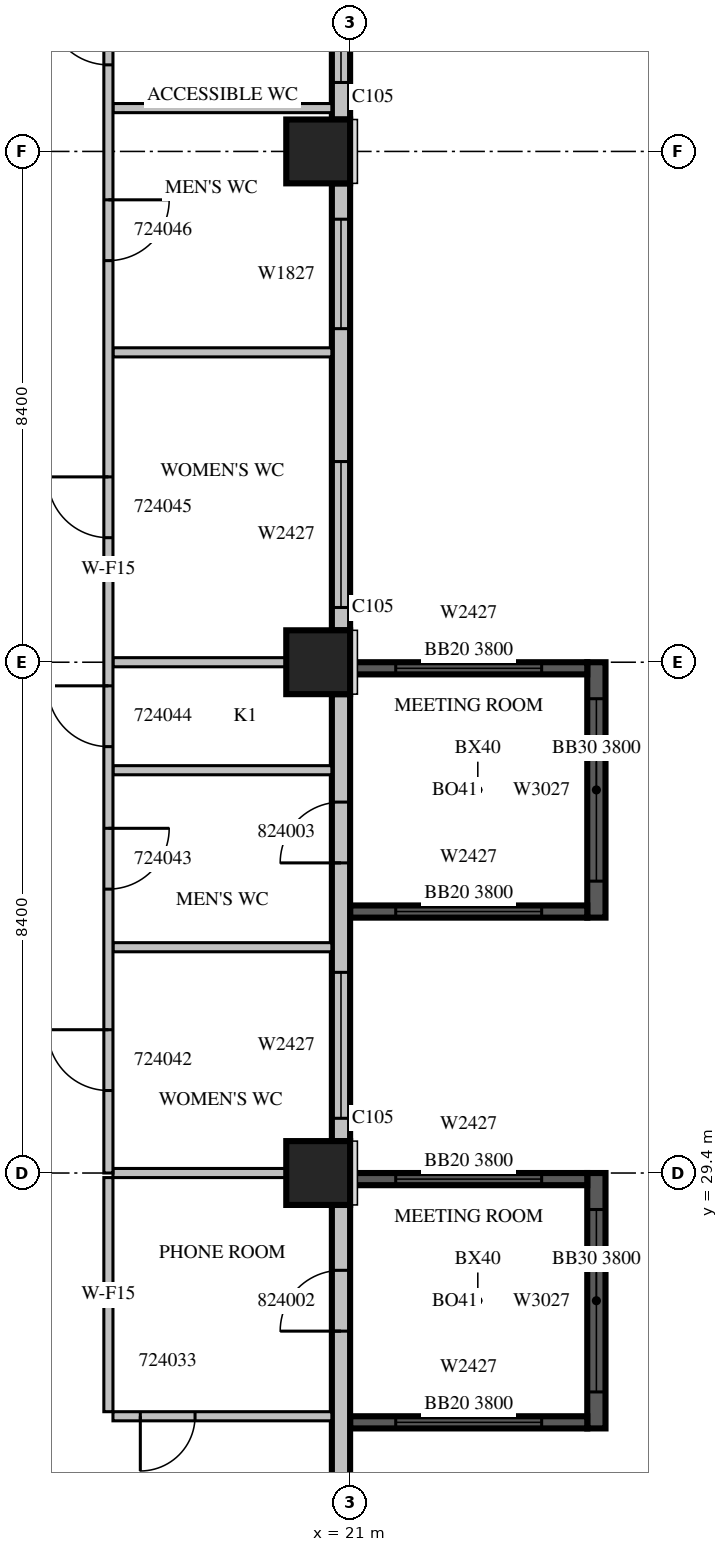
"""IFC4 building model, lengths in metres.
Left out: names, types, materials, properties, quantities, classifications, styles, units other than length and angle.
Written with IfcOpenShell. Run it as: python <this file> out.ifc"""

import sys

from ifc_helpers import new_model, si_unit, direction, frame, frame_2d, origin, origin_2d, place, context, subcontext, project, spatial, rectangle, extrude, source, transform, mapped, element, fill, save


model = new_model("IFC4")
c1 = context("Model", 3, precision=1e-05, world=origin(), true_north=direction((0.0, 1.0)))
c2 = subcontext(c1, "Body", "Model", "MODEL_VIEW")
j1 = project(units=[si_unit("LENGTHUNIT", "METRE"), si_unit("PLANEANGLEUNIT", "RADIAN")], contexts=[c1])
p1 = place(None, origin())
s1 = spatial("IfcSite", under=j1, at=p1, CompositionType="ELEMENT")
p2 = place(p1, origin())
s2 = spatial("IfcBuilding", under=s1, at=p2, CompositionType="ELEMENT")
p3 = place(p2, frame((0.0, 0.0, 111.9)))
s3 = spatial("IfcBuildingStorey", under=s2, at=p3, CompositionType="ELEMENT", Elevation=111.9)
m1 = source(origin(), c2, "Body", "SweptSolid", [
    extrude(rectangle(XDim=1.05, YDim=1.05, at=origin_2d()), origin(), (0.0, 0.0, 1.0), 4.2),
])
for number, where, z_axis, x_axis in (
    (1, (20.475, 29.4, 0.0), (0.0, 0.0, 1.0), (1.0, 0.0, 0.0)),
    (2, (20.475, 37.8, 0.0), (0.0, 0.0, 1.0), (1.0, 0.0, 0.0)),
    (3, (20.475, 46.2, 0.0), (0.0, 0.0, 1.0), (1.0, 0.0, 0.0)),
):
    element("IfcColumn", number, at=place(p3, frame(where, z_axis=z_axis, x_axis=x_axis)), inside=s3, PredefinedType="COLUMN", context=c2, shape_type="MappedRepresentation", body=[
        mapped(m1, transform((0.0, 0.0, 0.0), scale=1.0)),
    ])
m2 = source(origin(), c2, "Body", "SweptSolid", [
    extrude(rectangle(XDim=4.2, YDim=0.3, at=frame_2d((2.1, 0.0))), origin(), (0.0, 0.0, 1.0), 3.8),
])
p4 = place(p3, frame((25.05, 25.2, 0.0), z_axis=(0.0, 0.0, 1.0), x_axis=(0.0, 1.0, 0.0)))
e4 = element("IfcWall", 4, at=p4, inside=s3, PredefinedType="SOLIDWALL", context=c2, shape_type="MappedRepresentation", body=[
    mapped(m2, transform((0.0, 0.0, 0.0), scale=1.0)),
])
m3 = source(origin(), c2, "Body", "SweptSolid", [
    extrude(rectangle(XDim=3.0, YDim=2.7, at=frame_2d((1.5, 1.35))), frame((0.0, 0.16, 0.0), z_axis=(0.0, -1.0, 0.0), x_axis=(1.0, 0.0, 0.0)), (0.0, 0.0, 1.0), 0.32),
])
p5 = place(p4, frame((0.6, 0.0, 0.6)))
e5 = element("IfcOpeningElement", 5, at=p5, cuts=e4, PredefinedType="OPENING", context=c2, shape_type="MappedRepresentation", body=[
    mapped(m3, transform((0.0, 0.0, 0.0), scale=1.0)),
])
m4 = source(origin(), c2, "Body", "SweptSolid", [
    extrude(rectangle(XDim=3.9, YDim=0.2, at=frame_2d((1.95, 0.0))), origin(), (0.0, 0.0, 1.0), 3.8),
])
p6 = place(p3, frame((21.0, 25.3, 0.0), z_axis=(0.0, 0.0, 1.0), x_axis=(1.0, 0.0, 0.0)))
e6 = element("IfcWall", 6, at=p6, inside=s3, PredefinedType="SOLIDWALL", context=c2, shape_type="MappedRepresentation", body=[
    mapped(m4, transform((0.0, 0.0, 0.0), scale=1.0)),
])
m5 = source(origin(), c2, "Body", "SweptSolid", [
    extrude(rectangle(XDim=2.4, YDim=2.7, at=frame_2d((1.2, 1.35))), frame((0.0, 0.11, 0.0), z_axis=(0.0, -1.0, 0.0), x_axis=(1.0, 0.0, 0.0)), (0.0, 0.0, 1.0), 0.22),
])
p7 = place(p6, frame((0.75, 0.0, 0.6)))
e7 = element("IfcOpeningElement", 7, at=p7, cuts=e6, PredefinedType="OPENING", context=c2, shape_type="MappedRepresentation", body=[
    mapped(m5, transform((0.0, 0.0, 0.0), scale=1.0)),
])
p8 = place(p3, frame((21.0, 29.3, 0.0), z_axis=(0.0, 0.0, 1.0), x_axis=(1.0, 0.0, 0.0)))
e8 = element("IfcWall", 8, at=p8, inside=s3, PredefinedType="SOLIDWALL", context=c2, shape_type="MappedRepresentation", body=[
    mapped(m4, transform((0.0, 0.0, 0.0), scale=1.0)),
])
p9 = place(p8, frame((0.75, 0.0, 0.6)))
e9 = element("IfcOpeningElement", 9, at=p9, cuts=e8, PredefinedType="OPENING", context=c2, shape_type="MappedRepresentation", body=[
    mapped(m5, transform((0.0, 0.0, 0.0), scale=1.0)),
])
p10 = place(p3, frame((25.05, 33.6, 0.0), z_axis=(0.0, 0.0, 1.0), x_axis=(0.0, 1.0, 0.0)))
e10 = element("IfcWall", 10, at=p10, inside=s3, PredefinedType="SOLIDWALL", context=c2, shape_type="MappedRepresentation", body=[
    mapped(m2, transform((0.0, 0.0, 0.0), scale=1.0)),
])
p11 = place(p10, frame((0.6, 0.0, 0.6)))
e11 = element("IfcOpeningElement", 11, at=p11, cuts=e10, PredefinedType="OPENING", context=c2, shape_type="MappedRepresentation", body=[
    mapped(m3, transform((0.0, 0.0, 0.0), scale=1.0)),
])
p12 = place(p3, frame((21.0, 33.7, 0.0), z_axis=(0.0, 0.0, 1.0), x_axis=(1.0, 0.0, 0.0)))
e12 = element("IfcWall", 12, at=p12, inside=s3, PredefinedType="SOLIDWALL", context=c2, shape_type="MappedRepresentation", body=[
    mapped(m4, transform((0.0, 0.0, 0.0), scale=1.0)),
])
p13 = place(p12, frame((0.75, 0.0, 0.6)))
e13 = element("IfcOpeningElement", 13, at=p13, cuts=e12, PredefinedType="OPENING", context=c2, shape_type="MappedRepresentation", body=[
    mapped(m5, transform((0.0, 0.0, 0.0), scale=1.0)),
])
p14 = place(p3, frame((21.0, 37.7, 0.0), z_axis=(0.0, 0.0, 1.0), x_axis=(1.0, 0.0, 0.0)))
e14 = element("IfcWall", 14, at=p14, inside=s3, PredefinedType="SOLIDWALL", context=c2, shape_type="MappedRepresentation", body=[
    mapped(m4, transform((0.0, 0.0, 0.0), scale=1.0)),
])
p15 = place(p14, frame((0.75, 0.0, 0.6)))
e15 = element("IfcOpeningElement", 15, at=p15, cuts=e14, PredefinedType="OPENING", context=c2, shape_type="MappedRepresentation", body=[
    mapped(m5, transform((0.0, 0.0, 0.0), scale=1.0)),
])
m6 = source(origin(), c2, "Body", "SweptSolid", [
    extrude(rectangle(XDim=6.875, YDim=0.3, at=frame_2d((3.438, 0.0))), origin(), (0.0, 0.0, 1.0), 3.8),
])
p16 = place(p3, frame((20.85, 22.0, 0.0), z_axis=(0.0, 0.0, 1.0), x_axis=(0.0, 1.0, 0.0)))
e16 = element("IfcWall", 16, at=p16, inside=s3, PredefinedType="STANDARD", context=c2, shape_type="MappedRepresentation", body=[
    mapped(m6, transform((0.0, 0.0, 0.0), scale=1.0)),
])
m7 = source(origin(), c2, "Body", "SweptSolid", [
    extrude(rectangle(XDim=1.8, YDim=2.7, at=frame_2d((0.9, 1.35))), frame((0.0, 0.16, 0.0), z_axis=(0.0, -1.0, 0.0), x_axis=(1.0, 0.0, 0.0)), (0.0, 0.0, 1.0), 0.32),
])
p17 = place(p16, frame((0.2, 0.0, 0.6)))
e17 = element("IfcOpeningElement", 17, at=p17, cuts=e16, PredefinedType="OPENING", context=c2, shape_type="MappedRepresentation", body=[
    mapped(m7, transform((0.0, 0.0, 0.0), scale=1.0)),
])
m8 = source(origin(), c2, "Body", "SweptSolid", [
    extrude(rectangle(XDim=1.0, YDim=2.1, at=frame_2d((0.5, 1.05))), frame((0.0, 0.16, 0.0), z_axis=(0.0, -1.0, 0.0), x_axis=(1.0, 0.0, 0.0)), (0.0, 0.0, 1.0), 0.32),
])
p18 = place(p16, frame((4.8, 0.0, 0.0)))
e18 = element("IfcOpeningElement", 18, at=p18, cuts=e16, PredefinedType="OPENING", context=c2, shape_type="MappedRepresentation", body=[
    mapped(m8, transform((0.0, 0.0, 0.0), scale=1.0)),
])
m9 = source(origin(), c2, "Body", "SweptSolid", [
    extrude(rectangle(XDim=7.35, YDim=0.3, at=frame_2d((3.675, 0.0))), origin(), (0.0, 0.0, 1.0), 3.8),
])
p19 = place(p3, frame((20.85, 29.925, 0.0), z_axis=(0.0, 0.0, 1.0), x_axis=(0.0, 1.0, 0.0)))
e19 = element("IfcWall", 19, at=p19, inside=s3, PredefinedType="STANDARD", context=c2, shape_type="MappedRepresentation", body=[
    mapped(m9, transform((0.0, 0.0, 0.0), scale=1.0)),
])
m10 = source(origin(), c2, "Body", "SweptSolid", [
    extrude(rectangle(XDim=2.4, YDim=2.7, at=frame_2d((1.2, 1.35))), frame((0.0, 0.16, 0.0), z_axis=(0.0, -1.0, 0.0), x_axis=(1.0, 0.0, 0.0)), (0.0, 0.0, 1.0), 0.32),
])
p20 = place(p19, frame((0.375, 0.0, 0.6)))
e20 = element("IfcOpeningElement", 20, at=p20, cuts=e19, PredefinedType="OPENING", context=c2, shape_type="MappedRepresentation", body=[
    mapped(m10, transform((0.0, 0.0, 0.0), scale=1.0)),
])
p21 = place(p19, frame((4.575, 0.0, 0.0)))
e21 = element("IfcOpeningElement", 21, at=p21, cuts=e19, PredefinedType="OPENING", context=c2, shape_type="MappedRepresentation", body=[
    mapped(m8, transform((0.0, 0.0, 0.0), scale=1.0)),
])
p22 = place(p3, frame((20.85, 38.325, 0.0), z_axis=(0.0, 0.0, 1.0), x_axis=(0.0, 1.0, 0.0)))
e22 = element("IfcWall", 22, at=p22, inside=s3, PredefinedType="STANDARD", context=c2, shape_type="MappedRepresentation", body=[
    mapped(m9, transform((0.0, 0.0, 0.0), scale=1.0)),
])
p23 = place(p22, frame((0.375, 0.0, 0.6)))
e23 = element("IfcOpeningElement", 23, at=p23, cuts=e22, PredefinedType="OPENING", context=c2, shape_type="MappedRepresentation", body=[
    mapped(m10, transform((0.0, 0.0, 0.0), scale=1.0)),
])
p24 = place(p22, frame((4.96, 0.0, 0.6)))
e24 = element("IfcOpeningElement", 24, at=p24, cuts=e22, PredefinedType="OPENING", context=c2, shape_type="MappedRepresentation", body=[
    mapped(m7, transform((0.0, 0.0, 0.0), scale=1.0)),
])
m11 = source(origin(), c2, "Body", "SweptSolid", [
    extrude(rectangle(XDim=2.835, YDim=0.3, at=frame_2d((1.417, 0.0))), origin(), (0.0, 0.0, 1.0), 3.8),
])
p25 = place(p3, frame((20.85, 46.725, 0.0), z_axis=(0.0, 0.0, 1.0), x_axis=(0.0, 1.0, 0.0)))
e25 = element("IfcWall", 25, at=p25, inside=s3, PredefinedType="STANDARD", context=c2, shape_type="MappedRepresentation", body=[
    mapped(m11, transform((0.0, 0.0, 0.0), scale=1.0)),
])
m12 = source(origin(), c2, "Body", "SweptSolid", [
    extrude(rectangle(XDim=1.2, YDim=2.7, at=frame_2d((0.6, 1.35))), frame((0.0, 0.16, 0.0), z_axis=(0.0, -1.0, 0.0), x_axis=(1.0, 0.0, 0.0)), (0.0, 0.0, 1.0), 0.32),
])
p26 = place(p25, frame((0.609, 0.0, 0.6)))
e26 = element("IfcOpeningElement", 26, at=p26, cuts=e25, PredefinedType="OPENING", context=c2, shape_type="MappedRepresentation", body=[
    mapped(m12, transform((0.0, 0.0, 0.0), scale=1.0)),
])
m13 = source(origin(), c2, "Body", "SweptSolid", [
    extrude(rectangle(XDim=3.6, YDim=0.15, at=frame_2d((1.8, 0.0))), origin(), (0.0, 0.0, 1.0), 3.8),
])
p27 = place(p3, frame((17.1, 25.4, 0.0), z_axis=(0.0, 0.0, 1.0), x_axis=(1.0, 0.0, 0.0)))
e27 = element("IfcWall", 27, at=p27, inside=s3, PredefinedType="PARTITIONING", context=c2, shape_type="MappedRepresentation", body=[
    mapped(m13, transform((0.0, 0.0, 0.0), scale=1.0)),
])
m14 = source(origin(), c2, "Body", "SweptSolid", [
    extrude(rectangle(XDim=0.9, YDim=2.1, at=frame_2d((0.45, 1.05))), frame((0.0, 0.085, 0.0), z_axis=(0.0, -1.0, 0.0), x_axis=(1.0, 0.0, 0.0)), (0.0, 0.0, 1.0), 0.17),
])
p28 = place(p27, frame((0.45, 0.0, 0.0)))
e28 = element("IfcOpeningElement", 28, at=p28, cuts=e27, PredefinedType="OPENING", context=c2, shape_type="MappedRepresentation", body=[
    mapped(m14, transform((0.0, 0.0, 0.0), scale=1.0)),
])
m15 = source(origin(), c2, "Body", "SweptSolid", [
    extrude(rectangle(XDim=3.85, YDim=0.15, at=frame_2d((1.925, 0.0))), origin(), (0.0, 0.0, 1.0), 3.8),
])
p29 = place(p3, frame((17.025, 29.325, 0.0), z_axis=(0.0, 0.0, 1.0), x_axis=(0.0, -1.0, 0.0)))
e29 = element("IfcWall", 29, at=p29, inside=s3, PredefinedType="PARTITIONING", context=c2, shape_type="MappedRepresentation", body=[
    mapped(m15, transform((0.0, 0.0, 0.0), scale=1.0)),
])
m16 = source(origin(), c2, "Body", "SweptSolid", [
    extrude(rectangle(XDim=2.851, YDim=0.15, at=frame_2d((1.425, 0.0))), origin(), (0.0, 0.0, 1.0), 3.8),
])
p30 = place(p3, frame((19.951, 29.4, 0.0), z_axis=(0.0, 0.0, 1.0), x_axis=(-1.0, 0.0, 0.0)))
e30 = element("IfcWall", 30, at=p30, inside=s3, PredefinedType="PARTITIONING", context=c2, shape_type="MappedRepresentation", body=[
    mapped(m16, transform((0.0, 0.0, 0.0), scale=1.0)),
])
for number, where, z_axis, x_axis in (
    (31, (17.1, 33.113, 0.0), (0.0, 0.0, 1.0), (1.0, 0.0, 0.0)),
    (32, (17.1, 36.024, 0.0), (0.0, 0.0, 1.0), (1.0, 0.0, 0.0)),
    (33, (17.1, 42.896, 0.0), (0.0, 0.0, 1.0), (1.0, 0.0, 0.0)),
    (34, (17.1, 46.913, 0.0), (0.0, 0.0, 1.0), (1.0, 0.0, 0.0)),
):
    element("IfcWall", number, at=place(p3, frame(where, z_axis=z_axis, x_axis=x_axis)), inside=s3, PredefinedType="PARTITIONING", context=c2, shape_type="MappedRepresentation", body=[
        mapped(m13, transform((0.0, 0.0, 0.0), scale=1.0)),
    ])
p31 = place(p3, frame((19.951, 37.8, 0.0), z_axis=(0.0, 0.0, 1.0), x_axis=(-1.0, 0.0, 0.0)))
e35 = element("IfcWall", 35, at=p31, inside=s3, PredefinedType="PARTITIONING", context=c2, shape_type="MappedRepresentation", body=[
    mapped(m16, transform((0.0, 0.0, 0.0), scale=1.0)),
])
m17 = source(origin(), c2, "Body", "SweptSolid", [
    extrude(rectangle(XDim=19.86, YDim=0.15, at=frame_2d((9.93, 0.0))), origin(), (0.0, 0.0, 1.0), 3.8),
])
p32 = place(p3, frame((17.025, 49.26, 0.0), z_axis=(0.0, 0.0, 1.0), x_axis=(0.0, -1.0, 0.0)))
e36 = element("IfcWall", 36, at=p32, inside=s3, PredefinedType="PARTITIONING", context=c2, shape_type="MappedRepresentation", body=[
    mapped(m17, transform((0.0, 0.0, 0.0), scale=1.0)),
])
m18 = source(origin(), c2, "Body", "SweptSolid", [
    extrude(rectangle(XDim=1.0, YDim=2.1, at=frame_2d((0.5, 1.05))), frame((0.0, 0.085, 0.0), z_axis=(0.0, -1.0, 0.0), x_axis=(1.0, 0.0, 0.0)), (0.0, 0.0, 1.0), 0.17),
])
p33 = place(p32, frame((17.503, 0.0, 0.0)))
e37 = element("IfcOpeningElement", 37, at=p33, cuts=e36, PredefinedType="OPENING", context=c2, shape_type="MappedRepresentation", body=[
    mapped(m18, transform((0.0, 0.0, 0.0), scale=1.0)),
])
p34 = place(p32, frame((14.191, 0.0, 0.0)))
e38 = element("IfcOpeningElement", 38, at=p34, cuts=e36, PredefinedType="OPENING", context=c2, shape_type="MappedRepresentation", body=[
    mapped(m18, transform((0.0, 0.0, 0.0), scale=1.0)),
])
p35 = place(p32, frame((11.848, 0.0, 0.0)))
e39 = element("IfcOpeningElement", 39, at=p35, cuts=e36, PredefinedType="OPENING", context=c2, shape_type="MappedRepresentation", body=[
    mapped(m18, transform((0.0, 0.0, 0.0), scale=1.0)),
])
p36 = place(p32, frame((8.412, 0.0, 0.0)))
e40 = element("IfcOpeningElement", 40, at=p36, cuts=e36, PredefinedType="OPENING", context=c2, shape_type="MappedRepresentation", body=[
    mapped(m18, transform((0.0, 0.0, 0.0), scale=1.0)),
])
p37 = place(p32, frame((3.856, 0.0, 0.0)))
e41 = element("IfcOpeningElement", 41, at=p37, cuts=e36, PredefinedType="OPENING", context=c2, shape_type="MappedRepresentation", body=[
    mapped(m18, transform((0.0, 0.0, 0.0), scale=1.0)),
])
p38 = place(p32, frame((0.636, 0.0, 0.0)))
e42 = element("IfcOpeningElement", 42, at=p38, cuts=e36, PredefinedType="OPENING", context=c2, shape_type="MappedRepresentation", body=[
    mapped(m18, transform((0.0, 0.0, 0.0), scale=1.0)),
])
m19 = source(origin(), c2, "Body", "SweptSolid", [
    extrude(rectangle(XDim=3.0, YDim=2.7, at=frame_2d((1.5, 1.35))), frame((0.0, 0.03, 0.0), z_axis=(0.0, -1.0, 0.0), x_axis=(1.0, 0.0, 0.0)), (0.0, 0.0, 1.0), 0.06),
])
p39 = place(p5, origin())
e43 = element("IfcWindow", 43, at=p39, inside=s3, PartitioningType="SINGLE_PANEL", PredefinedType="WINDOW", context=c2, shape_type="MappedRepresentation", body=[
    mapped(m19, transform((0.0, 0.0, 0.0), scale=1.0)),
])
fill(e5, e43)
m20 = source(origin(), c2, "Body", "SweptSolid", [
    extrude(rectangle(XDim=2.4, YDim=2.7, at=frame_2d((1.2, 1.35))), frame((0.0, 0.03, 0.0), z_axis=(0.0, -1.0, 0.0), x_axis=(1.0, 0.0, 0.0)), (0.0, 0.0, 1.0), 0.06),
])
p40 = place(p7, origin())
e44 = element("IfcWindow", 44, at=p40, inside=s3, PartitioningType="SINGLE_PANEL", PredefinedType="WINDOW", context=c2, shape_type="MappedRepresentation", body=[
    mapped(m20, transform((0.0, 0.0, 0.0), scale=1.0)),
])
fill(e7, e44)
p41 = place(p9, origin())
e45 = element("IfcWindow", 45, at=p41, inside=s3, PartitioningType="SINGLE_PANEL", PredefinedType="WINDOW", context=c2, shape_type="MappedRepresentation", body=[
    mapped(m20, transform((0.0, 0.0, 0.0), scale=1.0)),
])
fill(e9, e45)
p42 = place(p11, origin())
e46 = element("IfcWindow", 46, at=p42, inside=s3, PartitioningType="SINGLE_PANEL", PredefinedType="WINDOW", context=c2, shape_type="MappedRepresentation", body=[
    mapped(m19, transform((0.0, 0.0, 0.0), scale=1.0)),
])
fill(e11, e46)
p43 = place(p13, origin())
e47 = element("IfcWindow", 47, at=p43, inside=s3, PartitioningType="SINGLE_PANEL", PredefinedType="WINDOW", context=c2, shape_type="MappedRepresentation", body=[
    mapped(m20, transform((0.0, 0.0, 0.0), scale=1.0)),
])
fill(e13, e47)
p44 = place(p15, origin())
e48 = element("IfcWindow", 48, at=p44, inside=s3, PartitioningType="SINGLE_PANEL", PredefinedType="WINDOW", context=c2, shape_type="MappedRepresentation", body=[
    mapped(m20, transform((0.0, 0.0, 0.0), scale=1.0)),
])
fill(e15, e48)
p45 = place(p20, origin())
e49 = element("IfcWindow", 49, at=p45, inside=s3, PartitioningType="SINGLE_PANEL", PredefinedType="WINDOW", context=c2, shape_type="MappedRepresentation", body=[
    mapped(m20, transform((0.0, 0.0, 0.0), scale=1.0)),
])
fill(e20, e49)
p46 = place(p23, origin())
e50 = element("IfcWindow", 50, at=p46, inside=s3, PartitioningType="SINGLE_PANEL", PredefinedType="WINDOW", context=c2, shape_type="MappedRepresentation", body=[
    mapped(m20, transform((0.0, 0.0, 0.0), scale=1.0)),
])
fill(e23, e50)
m21 = source(origin(), c2, "Body", "SweptSolid", [
    extrude(rectangle(XDim=1.8, YDim=2.7, at=frame_2d((0.9, 1.35))), frame((0.0, 0.03, 0.0), z_axis=(0.0, -1.0, 0.0), x_axis=(1.0, 0.0, 0.0)), (0.0, 0.0, 1.0), 0.06),
])
p47 = place(p24, origin())
e51 = element("IfcWindow", 51, at=p47, inside=s3, PartitioningType="SINGLE_PANEL", PredefinedType="WINDOW", context=c2, shape_type="MappedRepresentation", body=[
    mapped(m21, transform((0.0, 0.0, 0.0), scale=1.0)),
])
fill(e24, e51)
m22 = source(origin(), c2, "Body", "SweptSolid", [
    extrude(rectangle(XDim=1.2, YDim=2.7, at=frame_2d((0.6, 1.35))), frame((0.0, 0.03, 0.0), z_axis=(0.0, -1.0, 0.0), x_axis=(1.0, 0.0, 0.0)), (0.0, 0.0, 1.0), 0.06),
])
p48 = place(p26, origin())
e52 = element("IfcWindow", 52, at=p48, inside=s3, PartitioningType="SINGLE_PANEL", PredefinedType="WINDOW", context=c2, shape_type="MappedRepresentation", body=[
    mapped(m22, transform((0.0, 0.0, 0.0), scale=1.0)),
])
fill(e26, e52)
m23 = source(origin(), c2, "Body", "SweptSolid", [
    extrude(rectangle(XDim=0.9, YDim=2.1, at=frame_2d((0.45, 1.05))), frame((0.0, 0.025, 0.0), z_axis=(0.0, -1.0, 0.0), x_axis=(1.0, 0.0, 0.0)), (0.0, 0.0, 1.0), 0.05),
])
p49 = place(p28, origin())
e53 = element("IfcDoor", 53, at=p49, inside=s3, OperationType="SINGLE_SWING_RIGHT", PredefinedType="DOOR", context=c2, shape_type="MappedRepresentation", body=[
    mapped(m23, transform((0.0, 0.0, 0.0), scale=1.0)),
])
fill(e28, e53)
m24 = source(origin(), c2, "Body", "SweptSolid", [
    extrude(rectangle(XDim=1.0, YDim=2.1, at=frame_2d((0.5, 1.05))), frame((0.0, 0.025, 0.0), z_axis=(0.0, -1.0, 0.0), x_axis=(1.0, 0.0, 0.0)), (0.0, 0.0, 1.0), 0.05),
])
p50 = place(p33, origin())
e54 = element("IfcDoor", 54, at=p50, inside=s3, OperationType="SINGLE_SWING_RIGHT", PredefinedType="DOOR", context=c2, shape_type="MappedRepresentation", body=[
    mapped(m24, transform((0.0, 0.0, 0.0), scale=1.0)),
])
fill(e37, e54)
p51 = place(p34, origin())
e55 = element("IfcDoor", 55, at=p51, inside=s3, OperationType="SINGLE_SWING_LEFT", PredefinedType="DOOR", context=c2, shape_type="MappedRepresentation", body=[
    mapped(m24, transform((0.0, 0.0, 0.0), scale=1.0)),
])
fill(e38, e55)
p52 = place(p35, origin())
e56 = element("IfcDoor", 56, at=p52, inside=s3, OperationType="SINGLE_SWING_RIGHT", PredefinedType="DOOR", context=c2, shape_type="MappedRepresentation", body=[
    mapped(m24, transform((0.0, 0.0, 0.0), scale=1.0)),
])
fill(e39, e56)
p53 = place(p36, origin())
e57 = element("IfcDoor", 57, at=p53, inside=s3, OperationType="SINGLE_SWING_RIGHT", PredefinedType="DOOR", context=c2, shape_type="MappedRepresentation", body=[
    mapped(m24, transform((0.0, 0.0, 0.0), scale=1.0)),
])
fill(e40, e57)
p54 = place(p37, origin())
e58 = element("IfcDoor", 58, at=p54, inside=s3, OperationType="SINGLE_SWING_LEFT", PredefinedType="DOOR", context=c2, shape_type="MappedRepresentation", body=[
    mapped(m24, transform((0.0, 0.0, 0.0), scale=1.0)),
])
fill(e41, e58)
p55 = place(p38, origin())
e59 = element("IfcDoor", 59, at=p55, inside=s3, OperationType="SINGLE_SWING_RIGHT", PredefinedType="DOOR", context=c2, shape_type="MappedRepresentation", body=[
    mapped(m24, transform((0.0, 0.0, 0.0), scale=1.0)),
])
fill(e42, e59)
p56 = place(p18, origin())
e60 = element("IfcDoor", 60, at=p56, inside=s3, OperationType="SINGLE_SWING_LEFT", PredefinedType="DOOR", context=c2, shape_type="MappedRepresentation", body=[
    mapped(m24, transform((0.0, 0.0, 0.0), scale=1.0)),
])
fill(e18, e60)
p57 = place(p21, origin())
e61 = element("IfcDoor", 61, at=p57, inside=s3, OperationType="SINGLE_SWING_LEFT", PredefinedType="DOOR", context=c2, shape_type="MappedRepresentation", body=[
    mapped(m24, transform((0.0, 0.0, 0.0), scale=1.0)),
])
fill(e21, e61)
save(model, sys.argv[1])
